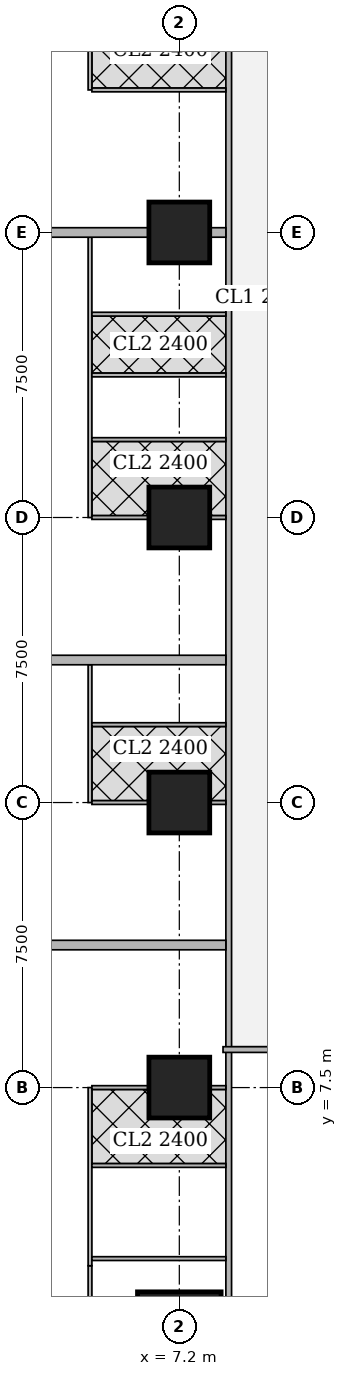
"""IFC4 building model, lengths in metres.
Left out: names, types, materials, properties, quantities, classifications, styles, units other than length and angle.
Written with IfcOpenShell. Run it as: python <this file> out.ifc"""

import sys

from ifc_helpers import new_model, si_unit, direction, frame, frame_2d, origin, origin_2d, place, context, subcontext, project, spatial, rectangle, extrude, element, fill, save


model = new_model("IFC4")
c1 = context("Model", 3, precision=1e-05, world=origin(), true_north=direction((0.0, 1.0)))
c2 = subcontext(c1, "Body", "Model", "MODEL_VIEW")
j1 = project(units=[si_unit("LENGTHUNIT", "METRE"), si_unit("PLANEANGLEUNIT", "RADIAN")], contexts=[c1])
p1 = place(None, origin())
s1 = spatial("IfcSite", under=j1, at=p1, CompositionType="ELEMENT")
p2 = place(p1, origin())
s2 = spatial("IfcBuilding", under=s1, at=p2, CompositionType="ELEMENT")
p3 = place(p2, frame((0.0, 0.0, 89.15)))
s3 = spatial("IfcBuildingStorey", under=s2, at=p3, CompositionType="ELEMENT", Elevation=89.15)
p4 = place(p3, frame((7.2, 1.025, 0.0), z_axis=(0.0, 0.0, 1.0), x_axis=(1.0, 0.0, 0.0)))
e1 = element("IfcColumn", 1, at=p4, inside=s3, PredefinedType="COLUMN", context=c2, shape_type="SweptSolid", body=[
    extrude(rectangle(XDim=2.2, YDim=2.2, at=origin_2d()), origin(), (0.0, 0.0, 1.0), 3.75),
])
for number, where, z_axis, x_axis in (
    (2, (7.2, 7.5, 0.0), (0.0, 0.0, 1.0), (1.0, 0.0, 0.0)),
    (3, (7.2, 15.0, 0.0), (0.0, 0.0, 1.0), (1.0, 0.0, 0.0)),
    (4, (7.2, 22.5, 0.0), (0.0, 0.0, 1.0), (1.0, 0.0, 0.0)),
    (5, (7.2, 30.0, 0.0), (0.0, 0.0, 1.0), (1.0, 0.0, 0.0)),
):
    element("IfcColumn", number, at=place(p3, frame(where, z_axis=z_axis, x_axis=x_axis)), inside=s3, PredefinedType="COLUMN", context=c2, shape_type="SweptSolid", body=[
        extrude(rectangle(XDim=1.6, YDim=1.6, at=origin_2d()), origin(), (0.0, 0.0, 1.0), 3.75),
    ])
p5 = place(p3, frame((8.5, -0.65, 0.0), z_axis=(0.0, 0.0, 1.0), x_axis=(0.0, 1.0, 0.0)))
e6 = element("IfcWall", 6, at=p5, inside=s3, PredefinedType="SOLIDWALL", context=c2, shape_type="SweptSolid", body=[
    extrude(rectangle(XDim=46.3, YDim=0.15, at=frame_2d((23.15, 0.0))), origin(), (0.0, 0.0, 1.0), 2.2),
])
p6 = place(p5, frame((9.525, 0.0, 0.0)))
e7 = element("IfcOpeningElement", 7, at=p6, cuts=e6, PredefinedType="OPENING", context=c2, shape_type="SweptSolid", body=[
    extrude(rectangle(XDim=1.0, YDim=2.1, at=frame_2d((0.5, 1.05))), frame((0.0, 0.085, 0.0), z_axis=(0.0, -1.0, 0.0), x_axis=(1.0, 0.0, 0.0)), (0.0, 0.0, 1.0), 0.17),
])
p7 = place(p5, frame((13.275, 0.0, 0.0)))
e8 = element("IfcOpeningElement", 8, at=p7, cuts=e6, PredefinedType="OPENING", context=c2, shape_type="SweptSolid", body=[
    extrude(rectangle(XDim=1.0, YDim=2.1, at=frame_2d((0.5, 1.05))), frame((0.0, 0.085, 0.0), z_axis=(0.0, -1.0, 0.0), x_axis=(1.0, 0.0, 0.0)), (0.0, 0.0, 1.0), 0.17),
])
p8 = place(p5, frame((20.775, 0.0, 0.0)))
e9 = element("IfcOpeningElement", 9, at=p8, cuts=e6, PredefinedType="OPENING", context=c2, shape_type="SweptSolid", body=[
    extrude(rectangle(XDim=1.0, YDim=2.1, at=frame_2d((0.5, 1.05))), frame((0.0, 0.085, 0.0), z_axis=(0.0, -1.0, 0.0), x_axis=(1.0, 0.0, 0.0)), (0.0, 0.0, 1.0), 0.17),
])
p9 = place(p5, frame((32.025, 0.0, 0.0)))
e10 = element("IfcOpeningElement", 10, at=p9, cuts=e6, PredefinedType="OPENING", context=c2, shape_type="SweptSolid", body=[
    extrude(rectangle(XDim=1.0, YDim=2.1, at=frame_2d((0.5, 1.05))), frame((0.0, 0.085, 0.0), z_axis=(0.0, -1.0, 0.0), x_axis=(1.0, 0.0, 0.0)), (0.0, 0.0, 1.0), 0.17),
])
p10 = place(p3, frame((40.053, 8.5, 0.0), z_axis=(0.0, 0.0, 1.0), x_axis=(-1.0, 0.0, 0.0)))
e11 = element("IfcWall", 11, at=p10, inside=s3, PredefinedType="SOLIDWALL", context=c2, shape_type="SweptSolid", body=[
    extrude(rectangle(XDim=31.703, YDim=0.15, at=frame_2d((15.852, 0.0))), origin(), (0.0, 0.0, 1.0), 3.5),
])
p11 = place(p10, frame((28.103, 0.0, 0.0)))
e12 = element("IfcOpeningElement", 12, at=p11, cuts=e11, PredefinedType="OPENING", context=c2, shape_type="SweptSolid", body=[
    extrude(rectangle(XDim=1.0, YDim=2.1, at=frame_2d((0.5, 1.05))), frame((0.0, 0.085, 0.0), z_axis=(0.0, -1.0, 0.0), x_axis=(1.0, 0.0, 0.0)), (0.0, 0.0, 1.0), 0.17),
])
p12 = place(p10, frame((19.953, 0.0, 0.0)))
e13 = element("IfcOpeningElement", 13, at=p12, cuts=e11, PredefinedType="OPENING", context=c2, shape_type="SweptSolid", body=[
    extrude(rectangle(XDim=1.0, YDim=2.1, at=frame_2d((0.5, 1.05))), frame((0.0, 0.085, 0.0), z_axis=(0.0, -1.0, 0.0), x_axis=(1.0, 0.0, 0.0)), (0.0, 0.0, 1.0), 0.17),
])
p13 = place(p10, frame((12.753, 0.0, 0.0)))
e14 = element("IfcOpeningElement", 14, at=p13, cuts=e11, PredefinedType="OPENING", context=c2, shape_type="SweptSolid", body=[
    extrude(rectangle(XDim=1.0, YDim=2.1, at=frame_2d((0.5, 1.05))), frame((0.0, 0.085, 0.0), z_axis=(0.0, -1.0, 0.0), x_axis=(1.0, 0.0, 0.0)), (0.0, 0.0, 1.0), 0.17),
])
p14 = place(p10, frame((0.15, 0.0, 0.0)))
e15 = element("IfcOpeningElement", 15, at=p14, cuts=e11, PredefinedType="OPENING", context=c2, shape_type="SweptSolid", body=[
    extrude(rectangle(XDim=1.0, YDim=2.1, at=frame_2d((0.5, 1.05))), frame((0.0, 0.085, 0.0), z_axis=(0.0, -1.0, 0.0), x_axis=(1.0, 0.0, 0.0)), (0.0, 0.0, 1.0), 0.17),
])
p15 = place(p3, frame((4.85, 0.326, 0.0), z_axis=(0.0, 0.0, 1.0), x_axis=(0.0, 1.0, 0.0)))
e16 = element("IfcWall", 16, at=p15, inside=s3, PredefinedType="PARTITIONING", context=c2, shape_type="SweptSolid", body=[
    extrude(rectangle(XDim=2.486, YDim=0.1, at=frame_2d((1.243, 0.0))), origin(), (0.0, 0.0, 1.0), 2.05),
])
p16 = place(p3, frame((4.85, 2.812, 0.0), z_axis=(0.0, 0.0, 1.0), x_axis=(0.0, 1.0, 0.0)))
e17 = element("IfcWall", 17, at=p16, inside=s3, PredefinedType="PARTITIONING", context=c2, shape_type="SweptSolid", body=[
    extrude(rectangle(XDim=4.688, YDim=0.1, at=frame_2d((2.344, 0.0))), origin(), (0.0, 0.0, 1.0), 3.5),
])
p17 = place(p16, frame((3.213, 0.0, 0.0)))
e18 = element("IfcOpeningElement", 18, at=p17, cuts=e17, PredefinedType="OPENING", context=c2, shape_type="SweptSolid", body=[
    extrude(rectangle(XDim=0.9, YDim=2.1, at=frame_2d((0.45, 1.05))), frame((0.0, 0.06, 0.0), z_axis=(0.0, -1.0, 0.0), x_axis=(1.0, 0.0, 0.0)), (0.0, 0.0, 1.0), 0.12),
])
p18 = place(p16, frame((1.338, 0.0, 0.0)))
e19 = element("IfcOpeningElement", 19, at=p18, cuts=e17, PredefinedType="OPENING", context=c2, shape_type="SweptSolid", body=[
    extrude(rectangle(XDim=0.9, YDim=2.1, at=frame_2d((0.45, 1.05))), frame((0.0, 0.06, 0.0), z_axis=(0.0, -1.0, 0.0), x_axis=(1.0, 0.0, 0.0)), (0.0, 0.0, 1.0), 0.12),
])
p19 = place(p3, frame((4.9, 7.5, 0.0), z_axis=(0.0, 0.0, 1.0), x_axis=(1.0, 0.0, 0.0)))
e20 = element("IfcWall", 20, at=p19, inside=s3, PredefinedType="PARTITIONING", context=c2, shape_type="SweptSolid", body=[
    extrude(rectangle(XDim=1.499, YDim=0.1, at=frame_2d((0.75, 0.0))), origin(), (0.0, 0.0, 1.0), 3.5),
])
p20 = place(p3, frame((8.001, 7.5, 0.0), z_axis=(0.0, 0.0, 1.0), x_axis=(1.0, 0.0, 0.0)))
e21 = element("IfcWall", 21, at=p20, inside=s3, PredefinedType="PARTITIONING", context=c2, shape_type="SweptSolid", body=[
    extrude(rectangle(XDim=0.424, YDim=0.1, at=frame_2d((0.212, 0.0))), origin(), (0.0, 0.0, 1.0), 3.5),
])
p21 = place(p3, frame((4.9, 5.45, 0.0), z_axis=(0.0, 0.0, 1.0), x_axis=(1.0, 0.0, 0.0)))
e22 = element("IfcWall", 22, at=p21, inside=s3, PredefinedType="PARTITIONING", context=c2, shape_type="SweptSolid", body=[
    extrude(rectangle(XDim=3.525, YDim=0.1, at=frame_2d((1.763, 0.0))), origin(), (0.0, 0.0, 1.0), 3.5),
])
p22 = place(p3, frame((4.85, 15.0, 0.0), z_axis=(0.0, 0.0, 1.0), x_axis=(0.0, 1.0, 0.0)))
e23 = element("IfcWall", 23, at=p22, inside=s3, PredefinedType="PARTITIONING", context=c2, shape_type="SweptSolid", body=[
    extrude(rectangle(XDim=3.625, YDim=0.1, at=frame_2d((1.812, 0.0))), origin(), (0.0, 0.0, 1.0), 3.5),
])
p23 = place(p22, frame((0.575, 0.0, 0.0)))
e24 = element("IfcOpeningElement", 24, at=p23, cuts=e23, PredefinedType="OPENING", context=c2, shape_type="SweptSolid", body=[
    extrude(rectangle(XDim=0.9, YDim=2.1, at=frame_2d((0.45, 1.05))), frame((0.0, 0.06, 0.0), z_axis=(0.0, -1.0, 0.0), x_axis=(1.0, 0.0, 0.0)), (0.0, 0.0, 1.0), 0.12),
])
p24 = place(p22, frame((2.45, 0.0, 0.0)))
e25 = element("IfcOpeningElement", 25, at=p24, cuts=e23, PredefinedType="OPENING", context=c2, shape_type="SweptSolid", body=[
    extrude(rectangle(XDim=0.9, YDim=2.1, at=frame_2d((0.45, 1.05))), frame((0.0, 0.06, 0.0), z_axis=(0.0, -1.0, 0.0), x_axis=(1.0, 0.0, 0.0)), (0.0, 0.0, 1.0), 0.12),
])
p25 = place(p3, frame((4.9, 15.0, 0.0), z_axis=(0.0, 0.0, 1.0), x_axis=(1.0, 0.0, 0.0)))
e26 = element("IfcWall", 26, at=p25, inside=s3, PredefinedType="PARTITIONING", context=c2, shape_type="SweptSolid", body=[
    extrude(rectangle(XDim=1.499, YDim=0.1, at=frame_2d((0.75, 0.0))), origin(), (0.0, 0.0, 1.0), 3.5),
])
p26 = place(p3, frame((8.001, 15.0, 0.0), z_axis=(0.0, 0.0, 1.0), x_axis=(1.0, 0.0, 0.0)))
e27 = element("IfcWall", 27, at=p26, inside=s3, PredefinedType="PARTITIONING", context=c2, shape_type="SweptSolid", body=[
    extrude(rectangle(XDim=0.424, YDim=0.1, at=frame_2d((0.212, 0.0))), origin(), (0.0, 0.0, 1.0), 3.5),
])
p27 = place(p3, frame((4.9, 17.05, 0.0), z_axis=(0.0, 0.0, 1.0), x_axis=(1.0, 0.0, 0.0)))
e28 = element("IfcWall", 28, at=p27, inside=s3, PredefinedType="PARTITIONING", context=c2, shape_type="SweptSolid", body=[
    extrude(rectangle(XDim=3.525, YDim=0.1, at=frame_2d((1.763, 0.0))), origin(), (0.0, 0.0, 1.0), 3.5),
])
p28 = place(p3, frame((3.65, 11.25, 0.0), z_axis=(0.0, 0.0, 1.0), x_axis=(1.0, 0.0, 0.0)))
e29 = element("IfcWall", 29, at=p28, inside=s3, PredefinedType="SOLIDWALL", context=c2, shape_type="SweptSolid", body=[
    extrude(rectangle(XDim=4.775, YDim=0.25, at=frame_2d((2.388, 0.0))), origin(), (0.0, 0.0, 1.0), 3.5),
])
p29 = place(p3, frame((4.85, 22.5, 0.0), z_axis=(0.0, 0.0, 1.0), x_axis=(0.0, 1.0, 0.0)))
e30 = element("IfcWall", 30, at=p29, inside=s3, PredefinedType="PARTITIONING", context=c2, shape_type="SweptSolid", body=[
    extrude(rectangle(XDim=7.375, YDim=0.1, at=frame_2d((3.688, 0.0))), origin(), (0.0, 0.0, 1.0), 3.5),
])
p30 = place(p29, frame((0.575, 0.0, 0.0)))
e31 = element("IfcOpeningElement", 31, at=p30, cuts=e30, PredefinedType="OPENING", context=c2, shape_type="SweptSolid", body=[
    extrude(rectangle(XDim=0.9, YDim=2.1, at=frame_2d((0.45, 1.05))), frame((0.0, 0.06, 0.0), z_axis=(0.0, -1.0, 0.0), x_axis=(1.0, 0.0, 0.0)), (0.0, 0.0, 1.0), 0.12),
])
p31 = place(p29, frame((4.1, 0.0, 0.0)))
e32 = element("IfcOpeningElement", 32, at=p31, cuts=e30, PredefinedType="OPENING", context=c2, shape_type="SweptSolid", body=[
    extrude(rectangle(XDim=0.9, YDim=2.1, at=frame_2d((0.45, 1.05))), frame((0.0, 0.06, 0.0), z_axis=(0.0, -1.0, 0.0), x_axis=(1.0, 0.0, 0.0)), (0.0, 0.0, 1.0), 0.12),
])
p32 = place(p29, frame((2.45, 0.0, 0.0)))
e33 = element("IfcOpeningElement", 33, at=p32, cuts=e30, PredefinedType="OPENING", context=c2, shape_type="SweptSolid", body=[
    extrude(rectangle(XDim=0.9, YDim=2.1, at=frame_2d((0.45, 1.05))), frame((0.0, 0.06, 0.0), z_axis=(0.0, -1.0, 0.0), x_axis=(1.0, 0.0, 0.0)), (0.0, 0.0, 1.0), 0.12),
])
p33 = place(p29, frame((5.975, 0.0, 0.0)))
e34 = element("IfcOpeningElement", 34, at=p33, cuts=e30, PredefinedType="OPENING", context=c2, shape_type="SweptSolid", body=[
    extrude(rectangle(XDim=0.9, YDim=2.1, at=frame_2d((0.45, 1.05))), frame((0.0, 0.06, 0.0), z_axis=(0.0, -1.0, 0.0), x_axis=(1.0, 0.0, 0.0)), (0.0, 0.0, 1.0), 0.12),
])
p34 = place(p3, frame((4.9, 22.5, 0.0), z_axis=(0.0, 0.0, 1.0), x_axis=(1.0, 0.0, 0.0)))
e35 = element("IfcWall", 35, at=p34, inside=s3, PredefinedType="PARTITIONING", context=c2, shape_type="SweptSolid", body=[
    extrude(rectangle(XDim=1.499, YDim=0.1, at=frame_2d((0.75, 0.0))), origin(), (0.0, 0.0, 1.0), 3.5),
])
p35 = place(p3, frame((8.001, 22.5, 0.0), z_axis=(0.0, 0.0, 1.0), x_axis=(1.0, 0.0, 0.0)))
e36 = element("IfcWall", 36, at=p35, inside=s3, PredefinedType="PARTITIONING", context=c2, shape_type="SweptSolid", body=[
    extrude(rectangle(XDim=0.424, YDim=0.1, at=frame_2d((0.212, 0.0))), origin(), (0.0, 0.0, 1.0), 3.5),
])
for number, where, z_axis, x_axis in (
    (37, (4.9, 26.25, 0.0), (0.0, 0.0, 1.0), (1.0, 0.0, 0.0)),
    (38, (4.9, 24.55, 0.0), (0.0, 0.0, 1.0), (1.0, 0.0, 0.0)),
    (39, (4.9, 27.85, 0.0), (0.0, 0.0, 1.0), (1.0, 0.0, 0.0)),
):
    element("IfcWall", number, at=place(p3, frame(where, z_axis=z_axis, x_axis=x_axis)), inside=s3, PredefinedType="PARTITIONING", context=c2, shape_type="SweptSolid", body=[
        extrude(rectangle(XDim=3.525, YDim=0.1, at=frame_2d((1.763, 0.0))), origin(), (0.0, 0.0, 1.0), 3.5),
    ])
p36 = place(p3, frame((3.65, 18.75, 0.0), z_axis=(0.0, 0.0, 1.0), x_axis=(1.0, 0.0, 0.0)))
e40 = element("IfcWall", 40, at=p36, inside=s3, PredefinedType="SOLIDWALL", context=c2, shape_type="SweptSolid", body=[
    extrude(rectangle(XDim=4.775, YDim=0.25, at=frame_2d((2.388, 0.0))), origin(), (0.0, 0.0, 1.0), 3.5),
])
p37 = place(p3, frame((4.85, 33.75, 0.0), z_axis=(0.0, 0.0, 1.0), x_axis=(0.0, 1.0, 0.0)))
e41 = element("IfcWall", 41, at=p37, inside=s3, PredefinedType="PARTITIONING", context=c2, shape_type="SweptSolid", body=[
    extrude(rectangle(XDim=8.449, YDim=0.1, at=frame_2d((4.225, 0.0))), origin(), (0.0, 0.0, 1.0), 3.5),
])
p38 = place(p37, frame((0.575, 0.0, 0.0)))
e42 = element("IfcOpeningElement", 42, at=p38, cuts=e41, PredefinedType="OPENING", context=c2, shape_type="SweptSolid", body=[
    extrude(rectangle(XDim=0.9, YDim=2.1, at=frame_2d((0.45, 1.05))), frame((0.0, 0.06, 0.0), z_axis=(0.0, -1.0, 0.0), x_axis=(1.0, 0.0, 0.0)), (0.0, 0.0, 1.0), 0.12),
])
p39 = place(p37, frame((4.1, 0.0, 0.0)))
e43 = element("IfcOpeningElement", 43, at=p39, cuts=e41, PredefinedType="OPENING", context=c2, shape_type="SweptSolid", body=[
    extrude(rectangle(XDim=0.9, YDim=2.1, at=frame_2d((0.45, 1.05))), frame((0.0, 0.06, 0.0), z_axis=(0.0, -1.0, 0.0), x_axis=(1.0, 0.0, 0.0)), (0.0, 0.0, 1.0), 0.12),
])
p40 = place(p37, frame((2.45, 0.0, 0.0)))
e44 = element("IfcOpeningElement", 44, at=p40, cuts=e41, PredefinedType="OPENING", context=c2, shape_type="SweptSolid", body=[
    extrude(rectangle(XDim=0.9, YDim=2.1, at=frame_2d((0.45, 1.05))), frame((0.0, 0.06, 0.0), z_axis=(0.0, -1.0, 0.0), x_axis=(1.0, 0.0, 0.0)), (0.0, 0.0, 1.0), 0.12),
])
p41 = place(p37, frame((5.975, 0.0, 0.0)))
e45 = element("IfcOpeningElement", 45, at=p41, cuts=e41, PredefinedType="OPENING", context=c2, shape_type="SweptSolid", body=[
    extrude(rectangle(XDim=0.9, YDim=2.1, at=frame_2d((0.45, 1.05))), frame((0.0, 0.06, 0.0), z_axis=(0.0, -1.0, 0.0), x_axis=(1.0, 0.0, 0.0)), (0.0, 0.0, 1.0), 0.12),
])
p42 = place(p3, frame((4.9, 33.75, 0.0), z_axis=(0.0, 0.0, 1.0), x_axis=(1.0, 0.0, 0.0)))
e46 = element("IfcWall", 46, at=p42, inside=s3, PredefinedType="PARTITIONING", context=c2, shape_type="SweptSolid", body=[
    extrude(rectangle(XDim=3.525, YDim=0.1, at=frame_2d((1.763, 0.0))), origin(), (0.0, 0.0, 1.0), 3.5),
])
p43 = place(p3, frame((3.65, 30.0, 0.0), z_axis=(0.0, 0.0, 1.0), x_axis=(1.0, 0.0, 0.0)))
e47 = element("IfcWall", 47, at=p43, inside=s3, PredefinedType="SOLIDWALL", context=c2, shape_type="SweptSolid", body=[
    extrude(rectangle(XDim=2.749, YDim=0.25, at=frame_2d((1.375, 0.0))), origin(), (0.0, 0.0, 1.0), 3.5),
])
p44 = place(p3, frame((8.001, 30.0, 0.0), z_axis=(0.0, 0.0, 1.0), x_axis=(1.0, 0.0, 0.0)))
e48 = element("IfcWall", 48, at=p44, inside=s3, PredefinedType="SOLIDWALL", context=c2, shape_type="SweptSolid", body=[
    extrude(rectangle(XDim=0.424, YDim=0.25, at=frame_2d((0.212, 0.0))), origin(), (0.0, 0.0, 1.0), 3.5),
])
p45 = place(p3, frame((8.425, 3.0, 0.0), z_axis=(0.0, 0.0, 1.0), x_axis=(-1.0, 0.0, 0.0)))
e49 = element("IfcWall", 49, at=p45, inside=s3, PredefinedType="PARTITIONING", context=c2, shape_type="SweptSolid", body=[
    extrude(rectangle(XDim=3.525, YDim=0.1, at=frame_2d((1.763, 0.0))), origin(), (0.0, 0.0, 1.0), 3.5),
])
p46 = place(p45, frame((2.35, 0.0, 0.0)))
e50 = element("IfcOpeningElement", 50, at=p46, cuts=e49, PredefinedType="OPENING", context=c2, shape_type="SweptSolid", body=[
    extrude(rectangle(XDim=0.9, YDim=2.1, at=frame_2d((0.45, 1.05))), frame((0.0, 0.06, 0.0), z_axis=(0.0, -1.0, 0.0), x_axis=(1.0, 0.0, 0.0)), (0.0, 0.0, 1.0), 0.12),
])
p47 = place(p17, origin())
e51 = element("IfcDoor", 51, at=p47, inside=s3, OperationType="SINGLE_SWING_LEFT", PredefinedType="DOOR", context=c2, shape_type="SweptSolid", body=[
    extrude(rectangle(XDim=0.9, YDim=2.1, at=frame_2d((0.45, 1.05))), frame((0.0, 0.025, 0.0), z_axis=(0.0, -1.0, 0.0), x_axis=(1.0, 0.0, 0.0)), (0.0, 0.0, 1.0), 0.05),
])
fill(e18, e51)
p48 = place(p18, origin())
e52 = element("IfcDoor", 52, at=p48, inside=s3, OperationType="SINGLE_SWING_LEFT", PredefinedType="DOOR", context=c2, shape_type="SweptSolid", body=[
    extrude(rectangle(XDim=0.9, YDim=2.1, at=frame_2d((0.45, 1.05))), frame((0.0, 0.025, 0.0), z_axis=(0.0, -1.0, 0.0), x_axis=(1.0, 0.0, 0.0)), (0.0, 0.0, 1.0), 0.05),
])
fill(e19, e52)
p49 = place(p6, origin())
e53 = element("IfcDoor", 53, at=p49, inside=s3, OperationType="SINGLE_SWING_LEFT", PredefinedType="DOOR", context=c2, shape_type="SweptSolid", body=[
    extrude(rectangle(XDim=1.0, YDim=2.1, at=frame_2d((0.5, 1.05))), frame((0.0, 0.025, 0.0), z_axis=(0.0, -1.0, 0.0), x_axis=(1.0, 0.0, 0.0)), (0.0, 0.0, 1.0), 0.05),
])
fill(e7, e53)
p50 = place(p23, origin())
e54 = element("IfcDoor", 54, at=p50, inside=s3, OperationType="SINGLE_SWING_RIGHT", PredefinedType="DOOR", context=c2, shape_type="SweptSolid", body=[
    extrude(rectangle(XDim=0.9, YDim=2.1, at=frame_2d((0.45, 1.05))), frame((0.0, 0.025, 0.0), z_axis=(0.0, -1.0, 0.0), x_axis=(1.0, 0.0, 0.0)), (0.0, 0.0, 1.0), 0.05),
])
fill(e24, e54)
p51 = place(p24, origin())
e55 = element("IfcDoor", 55, at=p51, inside=s3, OperationType="SINGLE_SWING_LEFT", PredefinedType="DOOR", context=c2, shape_type="SweptSolid", body=[
    extrude(rectangle(XDim=0.9, YDim=2.1, at=frame_2d((0.45, 1.05))), frame((0.0, 0.025, 0.0), z_axis=(0.0, -1.0, 0.0), x_axis=(1.0, 0.0, 0.0)), (0.0, 0.0, 1.0), 0.05),
])
fill(e25, e55)
p52 = place(p7, origin())
e56 = element("IfcDoor", 56, at=p52, inside=s3, OperationType="SINGLE_SWING_RIGHT", PredefinedType="DOOR", context=c2, shape_type="SweptSolid", body=[
    extrude(rectangle(XDim=1.0, YDim=2.1, at=frame_2d((0.5, 1.05))), frame((0.0, 0.025, 0.0), z_axis=(0.0, -1.0, 0.0), x_axis=(1.0, 0.0, 0.0)), (0.0, 0.0, 1.0), 0.05),
])
fill(e8, e56)
p53 = place(p30, origin())
e57 = element("IfcDoor", 57, at=p53, inside=s3, OperationType="SINGLE_SWING_RIGHT", PredefinedType="DOOR", context=c2, shape_type="SweptSolid", body=[
    extrude(rectangle(XDim=0.9, YDim=2.1, at=frame_2d((0.45, 1.05))), frame((0.0, 0.025, 0.0), z_axis=(0.0, -1.0, 0.0), x_axis=(1.0, 0.0, 0.0)), (0.0, 0.0, 1.0), 0.05),
])
fill(e31, e57)
p54 = place(p31, origin())
e58 = element("IfcDoor", 58, at=p54, inside=s3, OperationType="SINGLE_SWING_RIGHT", PredefinedType="DOOR", context=c2, shape_type="SweptSolid", body=[
    extrude(rectangle(XDim=0.9, YDim=2.1, at=frame_2d((0.45, 1.05))), frame((0.0, 0.025, 0.0), z_axis=(0.0, -1.0, 0.0), x_axis=(1.0, 0.0, 0.0)), (0.0, 0.0, 1.0), 0.05),
])
fill(e32, e58)
p55 = place(p32, origin())
e59 = element("IfcDoor", 59, at=p55, inside=s3, OperationType="SINGLE_SWING_RIGHT", PredefinedType="DOOR", context=c2, shape_type="SweptSolid", body=[
    extrude(rectangle(XDim=0.9, YDim=2.1, at=frame_2d((0.45, 1.05))), frame((0.0, 0.025, 0.0), z_axis=(0.0, -1.0, 0.0), x_axis=(1.0, 0.0, 0.0)), (0.0, 0.0, 1.0), 0.05),
])
fill(e33, e59)
p56 = place(p33, origin())
e60 = element("IfcDoor", 60, at=p56, inside=s3, OperationType="SINGLE_SWING_LEFT", PredefinedType="DOOR", context=c2, shape_type="SweptSolid", body=[
    extrude(rectangle(XDim=0.9, YDim=2.1, at=frame_2d((0.45, 1.05))), frame((0.0, 0.025, 0.0), z_axis=(0.0, -1.0, 0.0), x_axis=(1.0, 0.0, 0.0)), (0.0, 0.0, 1.0), 0.05),
])
fill(e34, e60)
p57 = place(p8, origin())
e61 = element("IfcDoor", 61, at=p57, inside=s3, OperationType="SINGLE_SWING_LEFT", PredefinedType="DOOR", context=c2, shape_type="SweptSolid", body=[
    extrude(rectangle(XDim=1.0, YDim=2.1, at=frame_2d((0.5, 1.05))), frame((0.0, 0.025, 0.0), z_axis=(0.0, -1.0, 0.0), x_axis=(1.0, 0.0, 0.0)), (0.0, 0.0, 1.0), 0.05),
])
fill(e9, e61)
p58 = place(p38, origin())
e62 = element("IfcDoor", 62, at=p58, inside=s3, OperationType="SINGLE_SWING_RIGHT", PredefinedType="DOOR", context=c2, shape_type="SweptSolid", body=[
    extrude(rectangle(XDim=0.9, YDim=2.1, at=frame_2d((0.45, 1.05))), frame((0.0, 0.025, 0.0), z_axis=(0.0, -1.0, 0.0), x_axis=(1.0, 0.0, 0.0)), (0.0, 0.0, 1.0), 0.05),
])
fill(e42, e62)
p59 = place(p9, origin())
e63 = element("IfcDoor", 63, at=p59, inside=s3, OperationType="SINGLE_SWING_RIGHT", PredefinedType="DOOR", context=c2, shape_type="SweptSolid", body=[
    extrude(rectangle(XDim=1.0, YDim=2.1, at=frame_2d((0.5, 1.05))), frame((0.0, 0.025, 0.0), z_axis=(0.0, -1.0, 0.0), x_axis=(1.0, 0.0, 0.0)), (0.0, 0.0, 1.0), 0.05),
])
fill(e10, e63)
p60 = place(p46, origin())
e64 = element("IfcDoor", 64, at=p60, inside=s3, OperationType="SINGLE_SWING_RIGHT", PredefinedType="DOOR", context=c2, shape_type="SweptSolid", body=[
    extrude(rectangle(XDim=0.9, YDim=2.1, at=frame_2d((0.45, 1.05))), frame((0.0, 0.025, 0.0), z_axis=(0.0, -1.0, 0.0), x_axis=(1.0, 0.0, 0.0)), (0.0, 0.0, 1.0), 0.05),
])
fill(e50, e64)
save(model, sys.argv[1])
